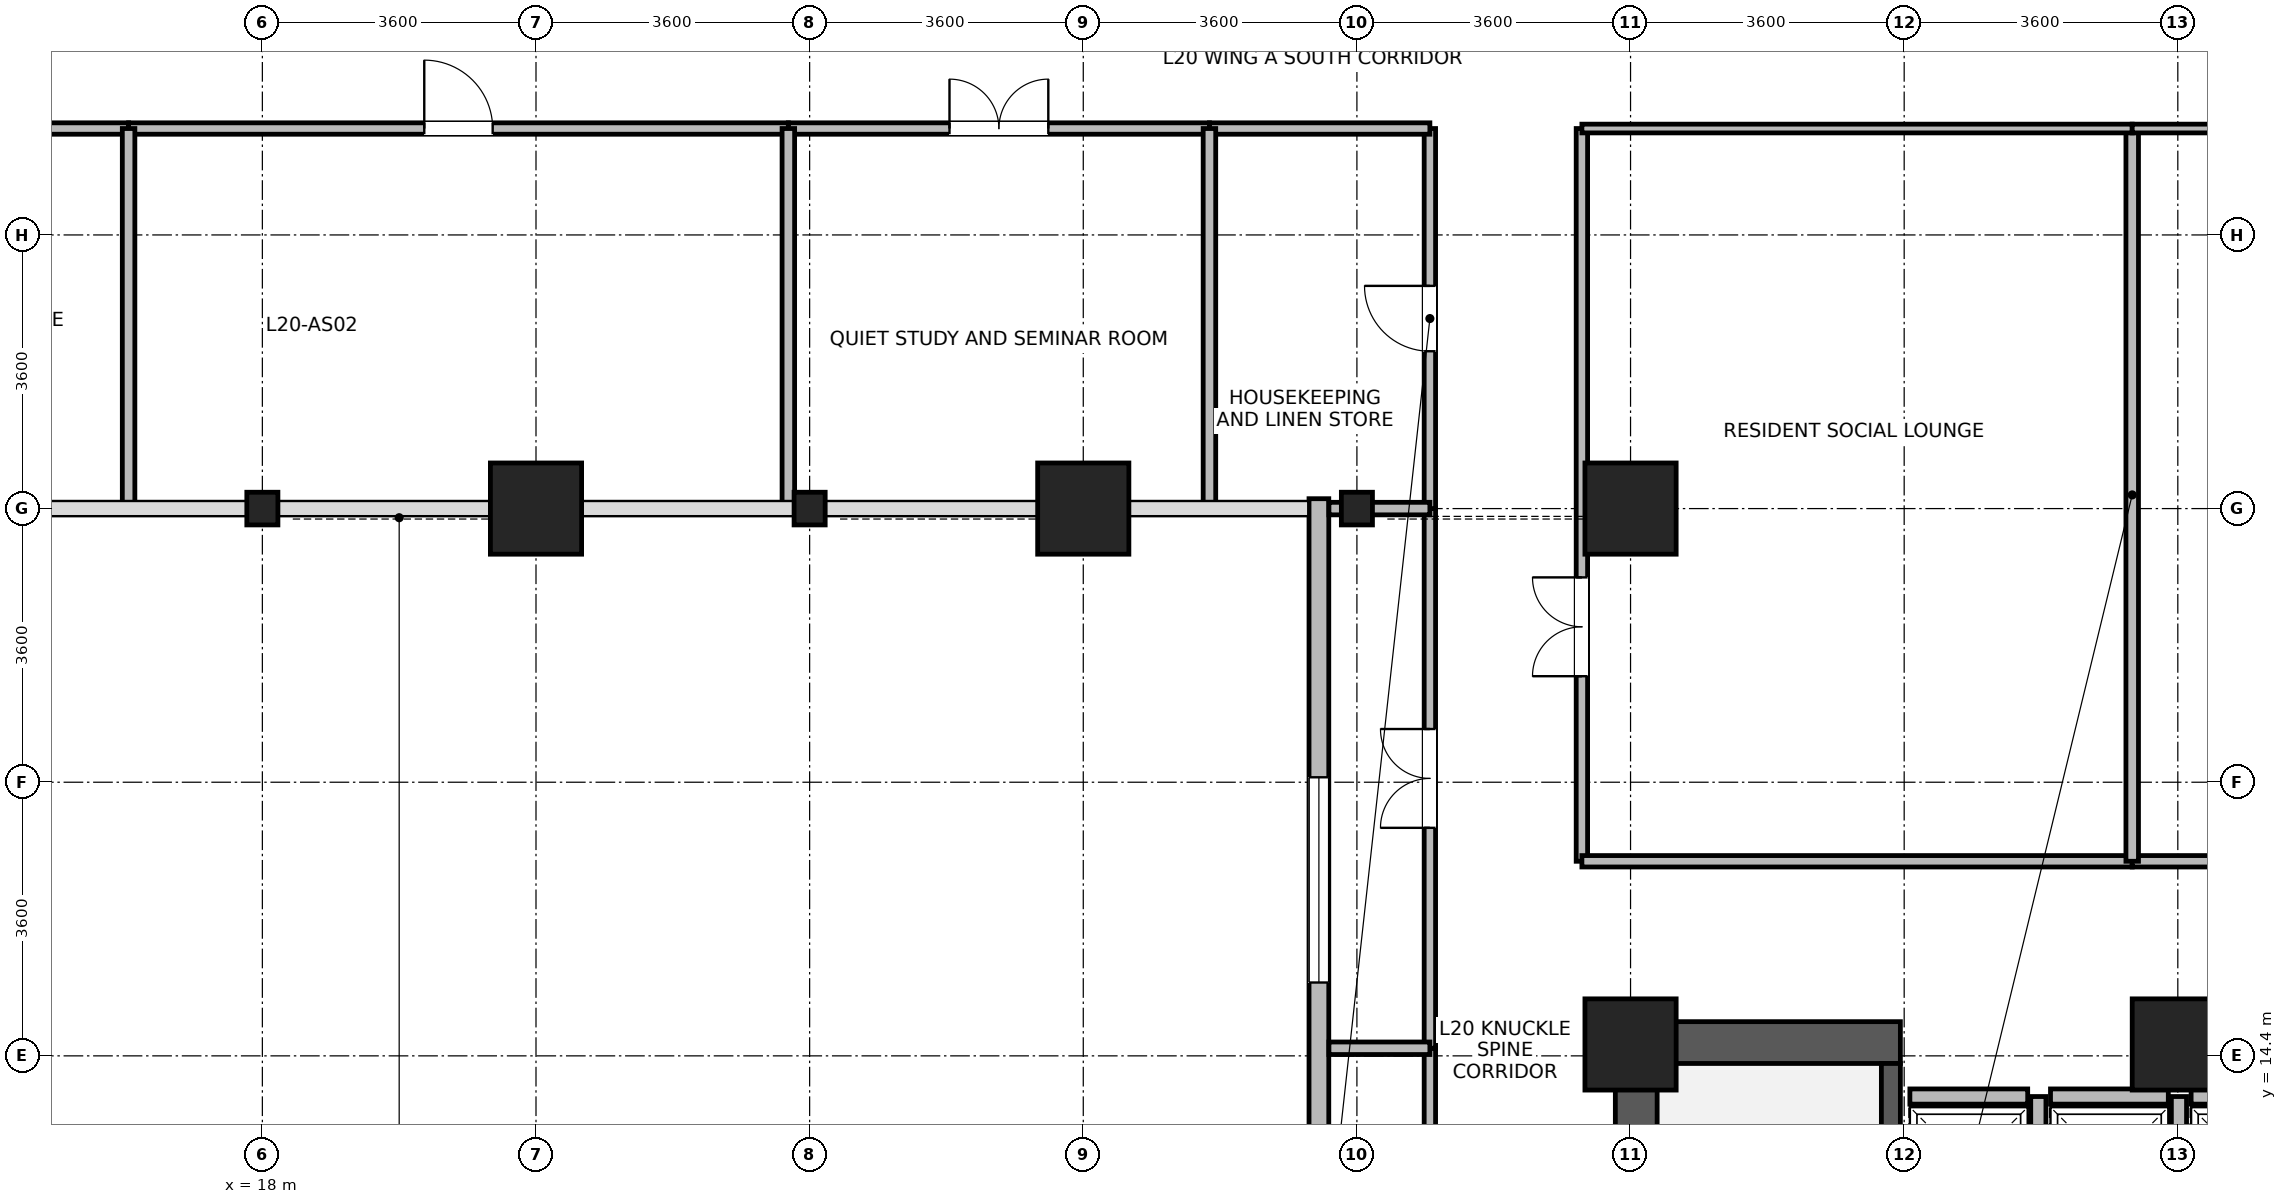
"""IFC4 building model, lengths in metres.
Left out: names, types, materials, properties, quantities, classifications, styles, units other than length and angle.
Written with IfcOpenShell. Run it as: python <this file> out.ifc"""

import sys

from ifc_helpers import new_model, si_unit, direction, frame, frame_2d, origin, origin_2d, place, context, subcontext, project, spatial, rectangle, i_section, extrude, source, transform, mapped, element, fill, save


model = new_model("IFC4")
c1 = context("Model", 3, precision=1e-05, world=origin(), true_north=direction((0.0, 1.0)))
c2 = subcontext(c1, "Body", "Model", "MODEL_VIEW")
j1 = project(units=[si_unit("LENGTHUNIT", "METRE"), si_unit("PLANEANGLEUNIT", "RADIAN")], contexts=[c1])
p1 = place(None, origin())
s1 = spatial("IfcSite", under=j1, at=p1, CompositionType="ELEMENT")
p2 = place(p1, origin())
s2 = spatial("IfcBuilding", under=s1, at=p2, CompositionType="ELEMENT")
p3 = place(p2, frame((0.0, 0.0, 82.3)))
s3 = spatial("IfcBuildingStorey", under=s2, at=p3, CompositionType="ELEMENT", Elevation=82.3)
p4 = place(p3, frame((36.075, 6.75, 0.0), z_axis=(0.0, 0.0, 1.0), x_axis=(0.0, 1.0, 0.0)))
e1 = element("IfcWall", 1, at=p4, inside=s3, PredefinedType="SHEAR", context=c2, shape_type="SweptSolid", body=[
    extrude(rectangle(XDim=8.1, YDim=0.55, at=frame_2d((4.05, 0.0))), origin(), (0.0, 0.0, 1.0), 3.45),
])
p5 = place(p3, frame((36.35, 14.575, 0.0), z_axis=(0.0, 0.0, 1.0), x_axis=(1.0, 0.0, 0.0)))
e2 = element("IfcWall", 2, at=p5, inside=s3, PredefinedType="SHEAR", context=c2, shape_type="SweptSolid", body=[
    extrude(rectangle(XDim=3.2, YDim=0.55, at=frame_2d((1.6, 0.0))), origin(), (0.0, 0.0, 1.0), 3.45),
])
p6 = place(p3, frame((39.425, 7.3, 0.0), z_axis=(0.0, 0.0, 1.0), x_axis=(0.0, 1.0, 0.0)))
e3 = element("IfcWall", 3, at=p6, inside=s3, PredefinedType="SHEAR", context=c2, shape_type="SweptSolid", body=[
    extrude(rectangle(XDim=7.0, YDim=0.25, at=frame_2d((3.5, 0.0))), origin(), (0.0, 0.0, 1.0), 3.45),
])
p7 = place(p6, frame((0.15, 0.0, 0.0)))
e4 = element("IfcOpeningElement", 4, at=p7, cuts=e3, PredefinedType="OPENING", context=c2, shape_type="SweptSolid", body=[
    extrude(rectangle(XDim=1.1, YDim=2.08, at=frame_2d((0.55, 1.04))), frame((0.0, 0.135, 0.0), z_axis=(0.0, -1.0, 0.0), x_axis=(1.0, 0.0, 0.0)), (0.0, 0.0, 1.0), 0.27),
])
m1 = source(origin(), c2, "Body", "SweptSolid", [
    extrude(rectangle(XDim=1.2, YDim=1.2, at=origin_2d()), origin(), (0.0, 0.0, 1.0), 3.7),
])
for number, where, z_axis, x_axis in (
    (5, (21.6, 21.6, 0.0), (0.0, 0.0, 1.0), (1.0, 0.0, 0.0)),
    (6, (28.8, 21.6, 0.0), (0.0, 0.0, 1.0), (1.0, 0.0, 0.0)),
    (7, (36.0, 21.6, 0.0), (0.0, 0.0, 1.0), (1.0, 0.0, 0.0)),
    (8, (36.0, 14.55, 0.0), (0.0, 0.0, 1.0), (1.0, 0.0, 0.0)),
    (9, (43.2, 14.55, 0.0), (0.0, 0.0, 1.0), (1.0, 0.0, 0.0)),
):
    element("IfcColumn", number, at=place(p3, frame(where, z_axis=z_axis, x_axis=x_axis)), inside=s3, PredefinedType="COLUMN", context=c2, shape_type="MappedRepresentation", body=[
        mapped(m1, transform((0.0, 0.0, 0.0), x_axis=(1.0, 0.0, 0.0), y_axis=(0.0, 1.0, 0.0), z_axis=(0.0, 0.0, 1.0), scale=1.0)),
    ])
m2 = source(origin(), c2, "Body", "SweptSolid", [
    extrude(i_section(OverallWidth=0.409, OverallDepth=0.43, WebThickness=0.024, FlangeThickness=0.033, FilletRadius=0.015, at=origin_2d()), origin(), (0.0, 0.0, 1.0), 3.7),
])
for number, where, z_axis, x_axis in (
    (10, (18.0, 21.6, 0.0), (0.0, 0.0, 1.0), (1.0, 0.0, 0.0)),
    (11, (25.2, 21.6, 0.0), (0.0, 0.0, 1.0), (1.0, 0.0, 0.0)),
    (12, (32.4, 21.6, 0.0), (0.0, 0.0, 1.0), (1.0, 0.0, 0.0)),
):
    element("IfcColumn", number, at=place(p3, frame(where, z_axis=z_axis, x_axis=x_axis)), inside=s3, PredefinedType="COLUMN", context=c2, shape_type="MappedRepresentation", body=[
        mapped(m2, transform((0.0, 0.0, 0.0), x_axis=(1.0, 0.0, 0.0), y_axis=(0.0, 1.0, 0.0), z_axis=(0.0, 0.0, 1.0), scale=1.0)),
    ])
p8 = place(p3, frame((31.9, 1.67, 0.0), z_axis=(0.0, 0.0, 1.0), x_axis=(0.0, 1.0, 0.0)))
e13 = element("IfcWall", 13, at=p8, inside=s3, PredefinedType="STANDARD", context=c2, shape_type="SweptSolid", body=[
    extrude(rectangle(XDim=20.06, YDim=0.26, at=frame_2d((10.03, 0.0))), origin(), (0.0, 0.0, 1.0), 3.43),
])
p9 = place(p8, frame((7.008, 0.0, 0.85)))
e14 = element("IfcOpeningElement", 14, at=p9, cuts=e13, PredefinedType="OPENING", context=c2, shape_type="SweptSolid", body=[
    extrude(rectangle(XDim=2.7, YDim=2.05, at=frame_2d((1.35, 1.025))), frame((0.0, 0.14, 0.0), z_axis=(0.0, -1.0, 0.0), x_axis=(1.0, 0.0, 0.0)), (0.0, 0.0, 1.0), 0.28),
])
p10 = place(p8, frame((13.695, 0.0, 0.85)))
e15 = element("IfcOpeningElement", 15, at=p10, cuts=e13, PredefinedType="OPENING", context=c2, shape_type="SweptSolid", body=[
    extrude(rectangle(XDim=2.7, YDim=2.05, at=frame_2d((1.35, 1.025))), frame((0.0, 0.14, 0.0), z_axis=(0.0, -1.0, 0.0), x_axis=(1.0, 0.0, 0.0)), (0.0, 0.0, 1.0), 0.28),
])
p11 = place(p3, frame((39.675, 13.865, 0.0), z_axis=(0.0, 0.0, 1.0), x_axis=(1.0, 0.0, 0.0)))
e16 = element("IfcWall", 16, at=p11, inside=s3, PredefinedType="PARTITIONING", context=c2, shape_type="SweptSolid", body=[
    extrude(rectangle(XDim=1.55, YDim=0.2, at=frame_2d((0.775, 0.0))), origin(), (0.0, 0.0, 1.0), 3.43),
])
p12 = place(p3, frame((41.365, 12.035, 0.0), z_axis=(0.0, 0.0, 1.0), x_axis=(0.0, 1.0, 0.0)))
e17 = element("IfcWall", 17, at=p12, inside=s3, PredefinedType="PARTITIONING", context=c2, shape_type="SweptSolid", body=[
    extrude(rectangle(XDim=1.83, YDim=0.2, at=frame_2d((0.915, 0.0))), origin(), (0.0, 0.0, 1.0), 3.43),
])
p13 = place(p3, frame((41.525, 13.865, 0.0), z_axis=(0.0, 0.0, 1.0), x_axis=(1.0, 0.0, 0.0)))
e18 = element("IfcWall", 18, at=p13, inside=s3, PredefinedType="PARTITIONING", context=c2, shape_type="SweptSolid", body=[
    extrude(rectangle(XDim=1.55, YDim=0.2, at=frame_2d((0.775, 0.0))), origin(), (0.0, 0.0, 1.0), 3.43),
])
p14 = place(p3, frame((43.215, 12.035, 0.0), z_axis=(0.0, 0.0, 1.0), x_axis=(0.0, 1.0, 0.0)))
e19 = element("IfcWall", 19, at=p14, inside=s3, PredefinedType="PARTITIONING", context=c2, shape_type="SweptSolid", body=[
    extrude(rectangle(XDim=1.83, YDim=0.2, at=frame_2d((0.915, 0.0))), origin(), (0.0, 0.0, 1.0), 3.43),
])
p15 = place(p3, frame((43.375, 13.865, 0.0), z_axis=(0.0, 0.0, 1.0), x_axis=(1.0, 0.0, 0.0)))
e20 = element("IfcWall", 20, at=p15, inside=s3, PredefinedType="PARTITIONING", context=c2, shape_type="SweptSolid", body=[
    extrude(rectangle(XDim=1.55, YDim=0.2, at=frame_2d((0.775, 0.0))), origin(), (0.0, 0.0, 1.0), 3.43),
])
p16 = place(p3, frame((35.36, 16.96, 0.0), z_axis=(0.0, 0.0, 1.0), x_axis=(0.0, 1.0, 0.0)))
e21 = element("IfcWall", 21, at=p16, inside=s3, PredefinedType="PARTITIONING", context=c2, shape_type="SweptSolid", body=[
    extrude(rectangle(XDim=9.64, YDim=0.15, at=frame_2d((4.82, 0.0))), origin(), (0.0, 0.0, 1.0), 3.43),
])
p17 = place(p16, frame((2.435, 0.0, 0.0)))
e22 = element("IfcOpeningElement", 22, at=p17, cuts=e21, PredefinedType="OPENING", context=c2, shape_type="SweptSolid", body=[
    extrude(rectangle(XDim=1.3, YDim=2.12, at=frame_2d((0.65, 1.06))), frame((0.0, 0.085, 0.0), z_axis=(0.0, -1.0, 0.0), x_axis=(1.0, 0.0, 0.0)), (0.0, 0.0, 1.0), 0.17),
])
p18 = place(p3, frame((6.832, 26.6, 0.0), z_axis=(0.0, 0.0, 1.0), x_axis=(1.0, 0.0, 0.0)))
e23 = element("IfcWall", 23, at=p18, inside=s3, PredefinedType="PARTITIONING", context=c2, shape_type="SweptSolid", body=[
    extrude(rectangle(XDim=9.408, YDim=0.15, at=frame_2d((4.704, 0.0))), origin(), (0.0, 0.0, 1.0), 3.43),
])
p19 = place(p18, frame((4.054, 0.0, 0.0)))
e24 = element("IfcOpeningElement", 24, at=p19, cuts=e23, PredefinedType="OPENING", context=c2, shape_type="SweptSolid", body=[
    extrude(rectangle(XDim=1.3, YDim=2.12, at=frame_2d((0.65, 1.06))), frame((0.0, 0.085, 0.0), z_axis=(0.0, -1.0, 0.0), x_axis=(1.0, 0.0, 0.0)), (0.0, 0.0, 1.0), 0.17),
])
p20 = place(p3, frame((16.24, 26.6, 0.0), z_axis=(0.0, 0.0, 1.0), x_axis=(1.0, 0.0, 0.0)))
e25 = element("IfcWall", 25, at=p20, inside=s3, PredefinedType="PARTITIONING", context=c2, shape_type="SweptSolid", body=[
    extrude(rectangle(XDim=8.68, YDim=0.15, at=frame_2d((4.34, 0.0))), origin(), (0.0, 0.0, 1.0), 3.43),
])
p21 = place(p20, frame((3.89, 0.0, 0.0)))
e26 = element("IfcOpeningElement", 26, at=p21, cuts=e25, PredefinedType="OPENING", context=c2, shape_type="SweptSolid", body=[
    extrude(rectangle(XDim=0.9, YDim=2.08, at=frame_2d((0.45, 1.04))), frame((0.0, 0.085, 0.0), z_axis=(0.0, -1.0, 0.0), x_axis=(1.0, 0.0, 0.0)), (0.0, 0.0, 1.0), 0.17),
])
p22 = place(p3, frame((33.36, 7.24, 0.0), z_axis=(0.0, 0.0, 1.0), x_axis=(0.0, 1.0, 0.0)))
e27 = element("IfcWall", 27, at=p22, inside=s3, PredefinedType="PARTITIONING", context=c2, shape_type="SweptSolid", body=[
    extrude(rectangle(XDim=7.26, YDim=0.15, at=frame_2d((3.63, 0.0))), origin(), (0.0, 0.0, 1.0), 3.43),
])
p23 = place(p22, frame((2.98, 0.0, 0.0)))
e28 = element("IfcOpeningElement", 28, at=p23, cuts=e27, PredefinedType="OPENING", context=c2, shape_type="SweptSolid", body=[
    extrude(rectangle(XDim=1.3, YDim=2.12, at=frame_2d((0.65, 1.06))), frame((0.0, 0.085, 0.0), z_axis=(0.0, -1.0, 0.0), x_axis=(1.0, 0.0, 0.0)), (0.0, 0.0, 1.0), 0.17),
])
p24 = place(p3, frame((35.36, 16.96, 0.0), z_axis=(0.0, 0.0, 1.0), x_axis=(1.0, 0.0, 0.0)))
e29 = element("IfcWall", 29, at=p24, inside=s3, PredefinedType="PARTITIONING", context=c2, shape_type="SweptSolid", body=[
    extrude(rectangle(XDim=7.24, YDim=0.15, at=frame_2d((3.62, 0.0))), origin(), (0.0, 0.0, 1.0), 3.43),
])
p25 = place(p3, frame((33.36, 14.5, 0.0), z_axis=(0.0, 0.0, 1.0), x_axis=(0.0, 1.0, 0.0)))
e30 = element("IfcWall", 30, at=p25, inside=s3, PredefinedType="PARTITIONING", context=c2, shape_type="SweptSolid", body=[
    extrude(rectangle(XDim=7.1, YDim=0.15, at=frame_2d((3.55, 0.0))), origin(), (0.0, 0.0, 1.0), 3.43),
])
p26 = place(p25, frame((2.9, 0.0, 0.0)))
e31 = element("IfcOpeningElement", 31, at=p26, cuts=e30, PredefinedType="OPENING", context=c2, shape_type="SweptSolid", body=[
    extrude(rectangle(XDim=1.3, YDim=2.12, at=frame_2d((0.65, 1.06))), frame((0.0, 0.085, 0.0), z_axis=(0.0, -1.0, 0.0), x_axis=(1.0, 0.0, 0.0)), (0.0, 0.0, 1.0), 0.17),
])
p27 = place(p3, frame((42.6, 16.96, 0.0), z_axis=(0.0, 0.0, 1.0), x_axis=(1.0, 0.0, 0.0)))
e32 = element("IfcWall", 32, at=p27, inside=s3, PredefinedType="PARTITIONING", context=c2, shape_type="SweptSolid", body=[
    extrude(rectangle(XDim=6.92, YDim=0.15, at=frame_2d((3.46, 0.0))), origin(), (0.0, 0.0, 1.0), 3.43),
])
p28 = place(p27, frame((2.81, 0.0, 0.0)))
e33 = element("IfcOpeningElement", 33, at=p28, cuts=e32, PredefinedType="OPENING", context=c2, shape_type="SweptSolid", body=[
    extrude(rectangle(XDim=1.3, YDim=2.12, at=frame_2d((0.65, 1.06))), frame((0.0, 0.085, 0.0), z_axis=(0.0, -1.0, 0.0), x_axis=(1.0, 0.0, 0.0)), (0.0, 0.0, 1.0), 0.17),
])
p29 = place(p3, frame((24.92, 26.6, 0.0), z_axis=(0.0, 0.0, 1.0), x_axis=(1.0, 0.0, 0.0)))
e34 = element("IfcWall", 34, at=p29, inside=s3, PredefinedType="PARTITIONING", context=c2, shape_type="SweptSolid", body=[
    extrude(rectangle(XDim=5.54, YDim=0.15, at=frame_2d((2.77, 0.0))), origin(), (0.0, 0.0, 1.0), 3.43),
])
p30 = place(p29, frame((2.12, 0.0, 0.0)))
e35 = element("IfcOpeningElement", 35, at=p30, cuts=e34, PredefinedType="OPENING", context=c2, shape_type="SweptSolid", body=[
    extrude(rectangle(XDim=1.3, YDim=2.12, at=frame_2d((0.65, 1.06))), frame((0.0, 0.085, 0.0), z_axis=(0.0, -1.0, 0.0), x_axis=(1.0, 0.0, 0.0)), (0.0, 0.0, 1.0), 0.17),
])
p31 = place(p3, frame((33.36, 21.6, 0.0), z_axis=(0.0, 0.0, 1.0), x_axis=(0.0, 1.0, 0.0)))
e36 = element("IfcWall", 36, at=p31, inside=s3, PredefinedType="PARTITIONING", context=c2, shape_type="SweptSolid", body=[
    extrude(rectangle(XDim=5.0, YDim=0.15, at=frame_2d((2.5, 0.0))), origin(), (0.0, 0.0, 1.0), 3.43),
])
p32 = place(p31, frame((2.07, 0.0, 0.0)))
e37 = element("IfcOpeningElement", 37, at=p32, cuts=e36, PredefinedType="OPENING", context=c2, shape_type="SweptSolid", body=[
    extrude(rectangle(XDim=0.86, YDim=2.02, at=frame_2d((0.43, 1.01))), frame((0.0, 0.085, 0.0), z_axis=(0.0, -1.0, 0.0), x_axis=(1.0, 0.0, 0.0)), (0.0, 0.0, 1.0), 0.17),
])
p33 = place(p3, frame((30.46, 26.6, 0.0), z_axis=(0.0, 0.0, 1.0), x_axis=(1.0, 0.0, 0.0)))
e38 = element("IfcWall", 38, at=p33, inside=s3, PredefinedType="PARTITIONING", context=c2, shape_type="SweptSolid", body=[
    extrude(rectangle(XDim=2.9, YDim=0.15, at=frame_2d((1.45, 0.0))), origin(), (0.0, 0.0, 1.0), 3.43),
])
p34 = place(p3, frame((42.6, 16.96, 0.0), z_axis=(0.0, 0.0, 1.0), x_axis=(0.0, 1.0, 0.0)))
e39 = element("IfcWall", 39, at=p34, inside=s3, PredefinedType="PARTITIONING", context=c2, shape_type="SweptSolid", body=[
    extrude(rectangle(XDim=9.64, YDim=0.165, at=frame_2d((4.82, 0.0))), origin(), (0.0, 0.0, 1.0), 3.43),
])
p35 = place(p3, frame((35.36, 26.6, 0.0), z_axis=(0.0, 0.0, 1.0), x_axis=(1.0, 0.0, 0.0)))
e40 = element("IfcWall", 40, at=p35, inside=s3, PredefinedType="PARTITIONING", context=c2, shape_type="SweptSolid", body=[
    extrude(rectangle(XDim=7.24, YDim=0.115, at=frame_2d((3.62, 0.0))), origin(), (0.0, 0.0, 1.0), 3.43),
])
p36 = place(p3, frame((42.6, 26.6, 0.0), z_axis=(0.0, 0.0, 1.0), x_axis=(1.0, 0.0, 0.0)))
e41 = element("IfcWall", 41, at=p36, inside=s3, PredefinedType="PARTITIONING", context=c2, shape_type="SweptSolid", body=[
    extrude(rectangle(XDim=6.92, YDim=0.115, at=frame_2d((3.46, 0.0))), origin(), (0.0, 0.0, 1.0), 3.43),
])
for number, where, z_axis, x_axis in (
    (42, (16.24, 21.62, 0.0), (0.0, 0.0, 1.0), (0.0, 1.0, 0.0)),
    (43, (24.92, 21.62, 0.0), (0.0, 0.0, 1.0), (0.0, 1.0, 0.0)),
    (44, (30.46, 21.62, 0.0), (0.0, 0.0, 1.0), (0.0, 1.0, 0.0)),
):
    element("IfcWall", number, at=place(p3, frame(where, z_axis=z_axis, x_axis=x_axis)), inside=s3, PredefinedType="PARTITIONING", context=c2, shape_type="SweptSolid", body=[
        extrude(rectangle(XDim=4.98, YDim=0.165, at=frame_2d((2.49, 0.0))), origin(), (0.0, 0.0, 1.0), 3.43),
    ])
p37 = place(p3, frame((32.032, 14.5, 0.0), z_axis=(0.0, 0.0, 1.0), x_axis=(1.0, 0.0, 0.0)))
e45 = element("IfcWall", 45, at=p37, inside=s3, PredefinedType="PARTITIONING", context=c2, shape_type="SweptSolid", body=[
    extrude(rectangle(XDim=1.328, YDim=0.165, at=frame_2d((0.664, 0.0))), origin(), (0.0, 0.0, 1.0), 3.43),
])
p38 = place(p3, frame((32.032, 21.6, 0.0), z_axis=(0.0, 0.0, 1.0), x_axis=(1.0, 0.0, 0.0)))
e46 = element("IfcWall", 46, at=p38, inside=s3, PredefinedType="PARTITIONING", context=c2, shape_type="SweptSolid", body=[
    extrude(rectangle(XDim=1.328, YDim=0.165, at=frame_2d((0.664, 0.0))), origin(), (0.0, 0.0, 1.0), 2.93),
])
p39 = place(p10, origin())
e47 = element("IfcWindow", 47, at=p39, inside=s3, PartitioningType="SINGLE_PANEL", PredefinedType="WINDOW", context=c2, shape_type="SweptSolid", body=[
    extrude(rectangle(XDim=2.7, YDim=2.05, at=frame_2d((1.35, 1.025))), frame((0.0, 0.03, 0.0), z_axis=(0.0, -1.0, 0.0), x_axis=(1.0, 0.0, 0.0)), (0.0, 0.0, 1.0), 0.06),
])
fill(e15, e47)
p40 = place(p17, origin())
e48 = element("IfcDoor", 48, at=p40, inside=s3, OperationType="DOUBLE_DOOR_SINGLE_SWING", PredefinedType="DOOR", context=c2, shape_type="SweptSolid", body=[
    extrude(rectangle(XDim=1.3, YDim=2.12, at=frame_2d((0.65, 1.06))), frame((0.0, 0.025, 0.0), z_axis=(0.0, -1.0, 0.0), x_axis=(1.0, 0.0, 0.0)), (0.0, 0.0, 1.0), 0.05),
])
fill(e22, e48)
p41 = place(p21, origin())
e49 = element("IfcDoor", 49, at=p41, inside=s3, OperationType="SINGLE_SWING_LEFT", PredefinedType="DOOR", context=c2, shape_type="SweptSolid", body=[
    extrude(rectangle(XDim=0.9, YDim=2.08, at=frame_2d((0.45, 1.04))), frame((0.0, 0.025, 0.0), z_axis=(0.0, -1.0, 0.0), x_axis=(1.0, 0.0, 0.0)), (0.0, 0.0, 1.0), 0.05),
])
fill(e26, e49)
p42 = place(p26, origin())
e50 = element("IfcDoor", 50, at=p42, inside=s3, OperationType="DOUBLE_DOOR_SINGLE_SWING", PredefinedType="DOOR", context=c2, shape_type="SweptSolid", body=[
    extrude(rectangle(XDim=1.3, YDim=2.12, at=frame_2d((0.65, 1.06))), frame((0.0, 0.025, 0.0), z_axis=(0.0, -1.0, 0.0), x_axis=(1.0, 0.0, 0.0)), (0.0, 0.0, 1.0), 0.05),
])
fill(e31, e50)
p43 = place(p30, origin())
e51 = element("IfcDoor", 51, at=p43, inside=s3, OperationType="DOUBLE_DOOR_SINGLE_SWING", PredefinedType="DOOR", context=c2, shape_type="SweptSolid", body=[
    extrude(rectangle(XDim=1.3, YDim=2.12, at=frame_2d((0.65, 1.06))), frame((0.0, 0.025, 0.0), z_axis=(0.0, -1.0, 0.0), x_axis=(1.0, 0.0, 0.0)), (0.0, 0.0, 1.0), 0.05),
])
fill(e35, e51)
p44 = place(p32, origin())
e52 = element("IfcDoor", 52, at=p44, inside=s3, OperationType="SINGLE_SWING_RIGHT", PredefinedType="DOOR", context=c2, shape_type="SweptSolid", body=[
    extrude(rectangle(XDim=0.86, YDim=2.02, at=frame_2d((0.43, 1.01))), frame((0.0, 0.025, 0.0), z_axis=(0.0, -1.0, 0.0), x_axis=(1.0, 0.0, 0.0)), (0.0, 0.0, 1.0), 0.05),
])
fill(e37, e52)
save(model, sys.argv[1])
